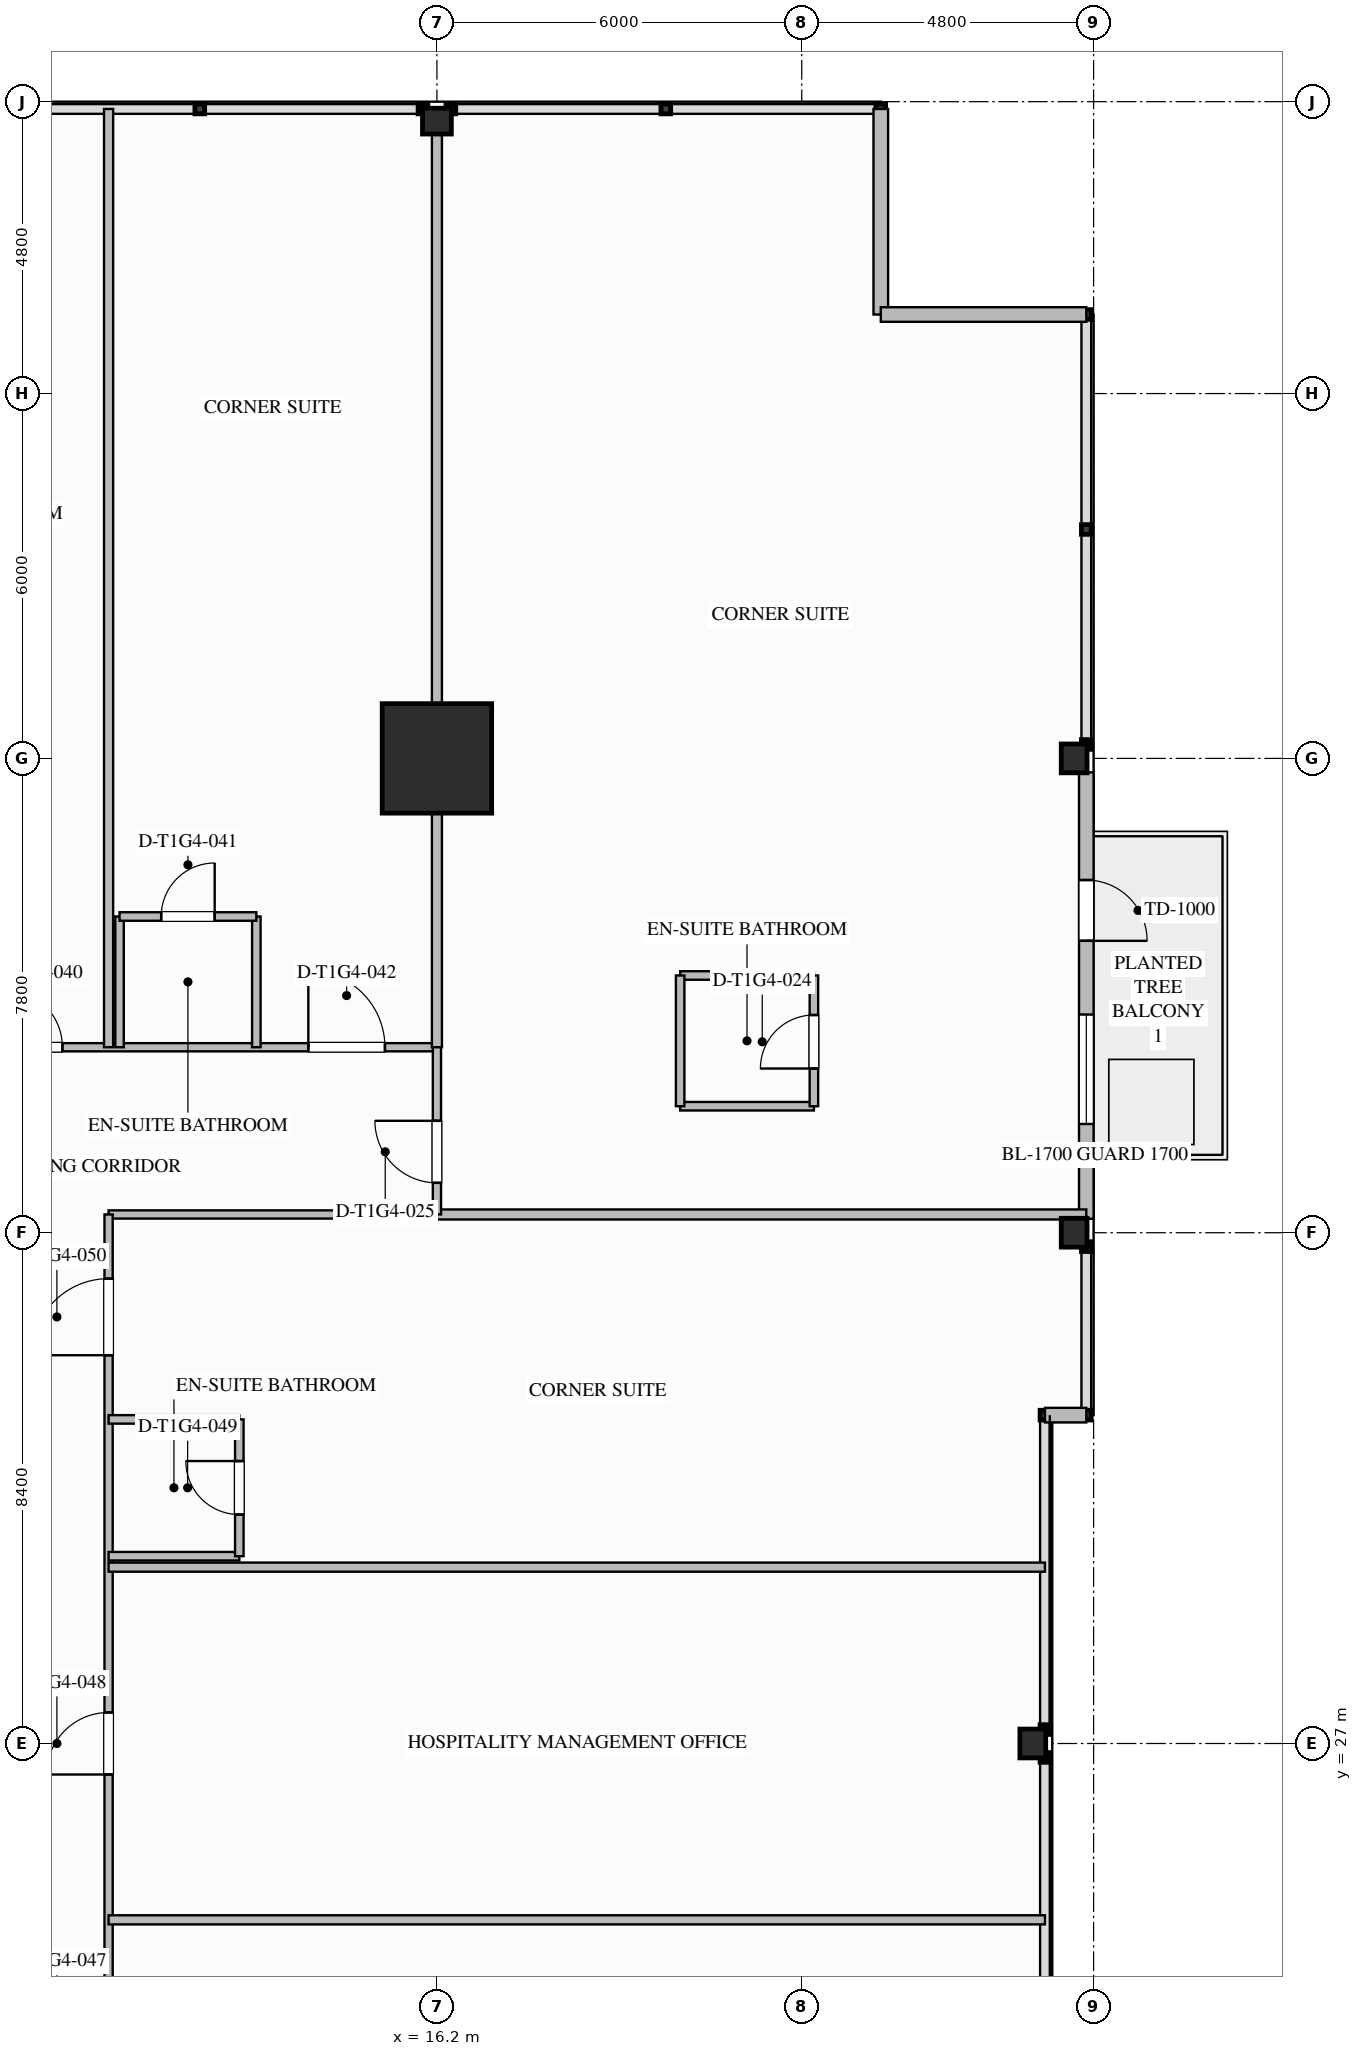
"""IFC4 building model, lengths in metres.
Left out: names, types, materials, properties, quantities, classifications, styles, units other than length and angle.
Written with IfcOpenShell. Run it as: python <this file> out.ifc"""

import sys

from ifc_helpers import new_model, si_unit, direction, frame, frame_2d, origin, origin_2d, place, context, subcontext, project, spatial, rectangle, i_section, extrude, element, fill, save


model = new_model("IFC4")
c1 = context("Model", 3, precision=1e-05, world=origin(), true_north=direction((0.0, 1.0)))
c2 = subcontext(c1, "Body", "Model", "MODEL_VIEW")
j1 = project(units=[si_unit("LENGTHUNIT", "METRE"), si_unit("PLANEANGLEUNIT", "RADIAN")], contexts=[c1])
p1 = place(None, origin())
s1 = spatial("IfcSite", under=j1, at=p1, CompositionType="ELEMENT")
p2 = place(p1, origin())
s2 = spatial("IfcBuilding", under=s1, at=p2, CompositionType="ELEMENT")
p3 = place(p2, frame((0.0, 0.0, 64.7)))
s3 = spatial("IfcBuildingStorey", under=s2, at=p3, CompositionType="ELEMENT", Elevation=64.7)
p4 = place(p3, frame((16.2, 43.2, 0.0), z_axis=(0.0, 0.0, 1.0), x_axis=(1.0, 0.0, 0.0)))
e1 = element("IfcColumn", 1, at=p4, inside=s3, PredefinedType="COLUMN", context=c2, shape_type="SweptSolid", body=[
    extrude(rectangle(XDim=1.8, YDim=1.8, at=origin_2d()), origin(), (0.0, 0.0, 1.0), 3.5),
])
for number, where, z_axis, x_axis in (
    (2, (26.0, 27.0, 0.0), (0.0, 0.0, 1.0), (1.0, 0.0, 0.0)),
    (3, (26.68, 35.4, 0.0), (0.0, 0.0, 1.0), (1.0, 0.0, 0.0)),
    (4, (26.68, 43.2, 0.0), (0.0, 0.0, 1.0), (1.0, 0.0, 0.0)),
    (5, (16.2, 53.68, 0.0), (0.0, 0.0, 1.0), (0.0, 1.0, 0.0)),
):
    element("IfcColumn", number, at=place(p3, frame(where, z_axis=z_axis, x_axis=x_axis)), inside=s3, PredefinedType="COLUMN", context=c2, shape_type="SweptSolid", body=[
        extrude(i_section(OverallWidth=0.424, OverallDepth=0.474, WebThickness=0.048, FlangeThickness=0.077, FilletRadius=0.03, at=origin_2d()), origin(), (0.0, 0.0, 1.0), 3.497),
    ])
p5 = place(p3, frame((26.88, 42.971, 0.0), z_axis=(0.0, 0.0, 1.0), x_axis=(0.0, -1.0, 0.0)))
e6 = element("IfcWall", 6, at=p5, inside=s3, PredefinedType="STANDARD", context=c2, shape_type="SweptSolid", body=[
    extrude(rectangle(XDim=7.342, YDim=0.24, at=frame_2d((3.671, 0.0))), origin(), (0.0, 0.0, 1.0), 2.629),
])
p6 = place(p5, frame((1.771, 0.0, 0.0)))
e7 = element("IfcOpeningElement", 7, at=p6, cuts=e6, PredefinedType="OPENING", context=c2, shape_type="SweptSolid", body=[
    extrude(rectangle(XDim=1.0, YDim=2.2, at=frame_2d((0.5, 1.1))), frame((0.0, 0.13, 0.0), z_axis=(0.0, -1.0, 0.0), x_axis=(1.0, 0.0, 0.0)), (0.0, 0.0, 1.0), 0.26),
])
p7 = place(p5, frame((3.983, 0.0, 0.75)))
e8 = element("IfcOpeningElement", 8, at=p7, cuts=e6, PredefinedType="OPENING", context=c2, shape_type="SweptSolid", body=[
    extrude(rectangle(XDim=1.8, YDim=1.779, at=frame_2d((0.9, 0.89))), frame((0.0, 0.13, 0.0), z_axis=(0.0, -1.0, 0.0), x_axis=(1.0, 0.0, 0.0)), (0.0, 0.0, 1.0), 0.26),
])
for number, where, z_axis, x_axis in (
    (9, (23.5, 53.88, 0.0), (0.0, 0.0, 1.0), (0.0, -1.0, 0.0)),
    (10, (23.5, 50.5, 0.0), (0.0, 0.0, 1.0), (1.0, 0.0, 0.0)),
):
    element("IfcWall", number, at=place(p3, frame(where, z_axis=z_axis, x_axis=x_axis)), inside=s3, PredefinedType="STANDARD", context=c2, shape_type="SweptSolid", body=[
        extrude(rectangle(XDim=3.38, YDim=0.24, at=frame_2d((1.69, 0.0))), origin(), (0.0, 0.0, 1.0), 3.24),
    ])
p8 = place(p3, frame((26.88, 32.4, 0.0), z_axis=(0.0, 0.0, 1.0), x_axis=(-1.0, 0.0, 0.0)))
e11 = element("IfcWall", 11, at=p8, inside=s3, PredefinedType="STANDARD", context=c2, shape_type="SweptSolid", body=[
    extrude(rectangle(XDim=0.68, YDim=0.24, at=frame_2d((0.34, 0.0))), origin(), (0.0, 0.0, 1.0), 3.24),
])
p9 = place(p3, frame((-16.2, 38.45, 0.0), z_axis=(0.0, 0.0, 1.0), x_axis=(1.0, 0.0, 0.0)))
e12 = element("IfcWall", 12, at=p9, inside=s3, PredefinedType="PARTITIONING", context=c2, shape_type="SweptSolid", body=[
    extrude(rectangle(XDim=32.4, YDim=0.135, at=frame_2d((16.2, 0.0))), origin(), (0.0, 0.0, 1.0), 3.24),
])
p10 = place(p9, frame((3.285, 0.0, 0.0)))
e13 = element("IfcOpeningElement", 13, at=p10, cuts=e12, PredefinedType="OPENING", context=c2, shape_type="SweptSolid", body=[
    extrude(rectangle(XDim=1.26, YDim=2.2, at=frame_2d((0.63, 1.1))), frame((0.0, 0.077, 0.0), z_axis=(0.0, -1.0, 0.0), x_axis=(1.0, 0.0, 0.0)), (0.0, 0.0, 1.0), 0.155),
])
p11 = place(p9, frame((8.59, 0.0, 0.0)))
e14 = element("IfcOpeningElement", 14, at=p11, cuts=e12, PredefinedType="OPENING", context=c2, shape_type="SweptSolid", body=[
    extrude(rectangle(XDim=0.96, YDim=2.15, at=frame_2d((0.48, 1.075))), frame((0.0, 0.077, 0.0), z_axis=(0.0, -1.0, 0.0), x_axis=(1.0, 0.0, 0.0)), (0.0, 0.0, 1.0), 0.155),
])
p12 = place(p9, frame((13.84, 0.0, 0.0)))
e15 = element("IfcOpeningElement", 15, at=p12, cuts=e12, PredefinedType="OPENING", context=c2, shape_type="SweptSolid", body=[
    extrude(rectangle(XDim=1.26, YDim=2.2, at=frame_2d((0.63, 1.1))), frame((0.0, 0.077, 0.0), z_axis=(0.0, -1.0, 0.0), x_axis=(1.0, 0.0, 0.0)), (0.0, 0.0, 1.0), 0.155),
])
p13 = place(p9, frame((18.635, 0.0, 0.0)))
e16 = element("IfcOpeningElement", 16, at=p13, cuts=e12, PredefinedType="OPENING", context=c2, shape_type="SweptSolid", body=[
    extrude(rectangle(XDim=1.02, YDim=2.15, at=frame_2d((0.51, 1.075))), frame((0.0, 0.077, 0.0), z_axis=(0.0, -1.0, 0.0), x_axis=(1.0, 0.0, 0.0)), (0.0, 0.0, 1.0), 0.155),
])
p14 = place(p9, frame((25.281, 0.0, 0.0)))
e17 = element("IfcOpeningElement", 17, at=p14, cuts=e12, PredefinedType="OPENING", context=c2, shape_type="SweptSolid", body=[
    extrude(rectangle(XDim=0.96, YDim=2.15, at=frame_2d((0.48, 1.075))), frame((0.0, 0.077, 0.0), z_axis=(0.0, -1.0, 0.0), x_axis=(1.0, 0.0, 0.0)), (0.0, 0.0, 1.0), 0.155),
])
p15 = place(p9, frame((30.285, 0.0, 0.0)))
e18 = element("IfcOpeningElement", 18, at=p15, cuts=e12, PredefinedType="OPENING", context=c2, shape_type="SweptSolid", body=[
    extrude(rectangle(XDim=1.26, YDim=2.2, at=frame_2d((0.63, 1.1))), frame((0.0, 0.077, 0.0), z_axis=(0.0, -1.0, 0.0), x_axis=(1.0, 0.0, 0.0)), (0.0, 0.0, 1.0), 0.155),
])
p16 = place(p3, frame((10.8, 35.7, 0.0), z_axis=(0.0, 0.0, 1.0), x_axis=(1.0, 0.0, 0.0)))
e19 = element("IfcWall", 19, at=p16, inside=s3, PredefinedType="PARTITIONING", context=c2, shape_type="SweptSolid", body=[
    extrude(rectangle(XDim=5.4, YDim=0.135, at=frame_2d((2.7, 0.0))), origin(), (0.0, 0.0, 1.0), 3.24),
])
p17 = place(p3, frame((10.8, 18.3, 0.0), z_axis=(0.0, 0.0, 1.0), x_axis=(0.0, 1.0, 0.0)))
e20 = element("IfcWall", 20, at=p17, inside=s3, PredefinedType="PARTITIONING", context=c2, shape_type="SweptSolid", body=[
    extrude(rectangle(XDim=17.4, YDim=0.135, at=frame_2d((8.7, 0.0))), origin(), (0.0, 0.0, 1.0), 3.24),
])
p18 = place(p17, frame((3.485, 0.0, 0.0)))
e21 = element("IfcOpeningElement", 21, at=p18, cuts=e20, PredefinedType="OPENING", context=c2, shape_type="SweptSolid", body=[
    extrude(rectangle(XDim=1.26, YDim=2.2, at=frame_2d((0.63, 1.1))), frame((0.0, 0.077, 0.0), z_axis=(0.0, -1.0, 0.0), x_axis=(1.0, 0.0, 0.0)), (0.0, 0.0, 1.0), 0.155),
])
p19 = place(p17, frame((8.19, 0.0, 0.0)))
e22 = element("IfcOpeningElement", 22, at=p19, cuts=e20, PredefinedType="OPENING", context=c2, shape_type="SweptSolid", body=[
    extrude(rectangle(XDim=1.02, YDim=2.15, at=frame_2d((0.51, 1.075))), frame((0.0, 0.077, 0.0), z_axis=(0.0, -1.0, 0.0), x_axis=(1.0, 0.0, 0.0)), (0.0, 0.0, 1.0), 0.155),
])
p20 = place(p17, frame((15.085, 0.0, 0.0)))
e23 = element("IfcOpeningElement", 23, at=p20, cuts=e20, PredefinedType="OPENING", context=c2, shape_type="SweptSolid", body=[
    extrude(rectangle(XDim=1.26, YDim=2.2, at=frame_2d((0.63, 1.1))), frame((0.0, 0.077, 0.0), z_axis=(0.0, -1.0, 0.0), x_axis=(1.0, 0.0, 0.0)), (0.0, 0.0, 1.0), 0.155),
])
p21 = place(p3, frame((16.2, 38.45, 0.0), z_axis=(0.0, 0.0, 1.0), x_axis=(0.0, 1.0, 0.0)))
e24 = element("IfcWall", 24, at=p21, inside=s3, PredefinedType="PARTITIONING", context=c2, shape_type="SweptSolid", body=[
    extrude(rectangle(XDim=15.43, YDim=0.165, at=frame_2d((7.715, 0.0))), origin(), (0.0, 0.0, 1.0), 2.452),
])
p22 = place(p3, frame((16.2, 35.7, 0.0), z_axis=(0.0, 0.0, 1.0), x_axis=(1.0, 0.0, 0.0)))
e25 = element("IfcWall", 25, at=p22, inside=s3, PredefinedType="PARTITIONING", context=c2, shape_type="SweptSolid", body=[
    extrude(rectangle(XDim=10.68, YDim=0.165, at=frame_2d((5.34, 0.0))), origin(), (0.0, 0.0, 1.0), 2.452),
])
p23 = place(p3, frame((16.2, 35.7, 0.0), z_axis=(0.0, 0.0, 1.0), x_axis=(0.0, 1.0, 0.0)))
e26 = element("IfcWall", 26, at=p23, inside=s3, PredefinedType="PARTITIONING", context=c2, shape_type="SweptSolid", body=[
    extrude(rectangle(XDim=2.75, YDim=0.135, at=frame_2d((1.375, 0.0))), origin(), (0.0, 0.0, 1.0), 2.452),
])
p24 = place(p23, frame((0.52, 0.0, 0.0)))
e27 = element("IfcOpeningElement", 27, at=p24, cuts=e26, PredefinedType="OPENING", context=c2, shape_type="SweptSolid", body=[
    extrude(rectangle(XDim=1.02, YDim=2.15, at=frame_2d((0.51, 1.075))), frame((0.0, 0.077, 0.0), z_axis=(0.0, -1.0, 0.0), x_axis=(1.0, 0.0, 0.0)), (0.0, 0.0, 1.0), 0.155),
])
for number, where, z_axis, x_axis in (
    (28, (20.2, 37.48, 0.0), (0.0, 0.0, 1.0), (1.0, 0.0, 0.0)),
    (29, (20.2, 39.63, 0.0), (0.0, 0.0, 1.0), (1.0, 0.0, 0.0)),
):
    element("IfcWall", number, at=place(p3, frame(where, z_axis=z_axis, x_axis=x_axis)), inside=s3, PredefinedType="PLUMBINGWALL", context=c2, shape_type="SweptSolid", body=[
        extrude(rectangle(XDim=2.2, YDim=0.14, at=frame_2d((1.1, 0.0))), origin(), (0.0, 0.0, 1.0), 3.24),
    ])
p25 = place(p3, frame((20.2, 37.48, 0.0), z_axis=(0.0, 0.0, 1.0), x_axis=(0.0, 1.0, 0.0)))
e30 = element("IfcWall", 30, at=p25, inside=s3, PredefinedType="PLUMBINGWALL", context=c2, shape_type="SweptSolid", body=[
    extrude(rectangle(XDim=2.15, YDim=0.14, at=frame_2d((1.075, 0.0))), origin(), (0.0, 0.0, 1.0), 3.24),
])
p26 = place(p3, frame((22.4, 37.48, 0.0), z_axis=(0.0, 0.0, 1.0), x_axis=(0.0, 1.0, 0.0)))
e31 = element("IfcWall", 31, at=p26, inside=s3, PredefinedType="PLUMBINGWALL", context=c2, shape_type="SweptSolid", body=[
    extrude(rectangle(XDim=2.15, YDim=0.14, at=frame_2d((1.075, 0.0))), origin(), (0.0, 0.0, 1.0), 3.24),
])
p27 = place(p26, frame((0.62, 0.0, 0.0)))
e32 = element("IfcOpeningElement", 32, at=p27, cuts=e31, PredefinedType="OPENING", context=c2, shape_type="SweptSolid", body=[
    extrude(rectangle(XDim=0.88, YDim=2.1, at=frame_2d((0.44, 1.05))), frame((0.0, 0.08, 0.0), z_axis=(0.0, -1.0, 0.0), x_axis=(1.0, 0.0, 0.0)), (0.0, 0.0, 1.0), 0.16),
])
p28 = place(p3, frame((10.8, 38.45, 0.0), z_axis=(0.0, 0.0, 1.0), x_axis=(0.0, 1.0, 0.0)))
e33 = element("IfcWall", 33, at=p28, inside=s3, PredefinedType="PARTITIONING", context=c2, shape_type="SweptSolid", body=[
    extrude(rectangle(XDim=15.43, YDim=0.15, at=frame_2d((7.715, 0.0))), origin(), (0.0, 0.0, 1.0), 3.24),
])
for number, where, z_axis, x_axis in (
    (34, (10.98, 38.45, 0.0), (0.0, 0.0, 1.0), (0.0, 1.0, 0.0)),
    (35, (13.23, 38.45, 0.0), (0.0, 0.0, 1.0), (0.0, 1.0, 0.0)),
):
    element("IfcWall", number, at=place(p3, frame(where, z_axis=z_axis, x_axis=x_axis)), inside=s3, PredefinedType="PLUMBINGWALL", context=c2, shape_type="SweptSolid", body=[
        extrude(rectangle(XDim=2.15, YDim=0.14, at=frame_2d((1.075, 0.0))), origin(), (0.0, 0.0, 1.0), 3.24),
    ])
p29 = place(p3, frame((10.98, 40.6, 0.0), z_axis=(0.0, 0.0, 1.0), x_axis=(1.0, 0.0, 0.0)))
e36 = element("IfcWall", 36, at=p29, inside=s3, PredefinedType="PLUMBINGWALL", context=c2, shape_type="SweptSolid", body=[
    extrude(rectangle(XDim=2.25, YDim=0.14, at=frame_2d((1.125, 0.0))), origin(), (0.0, 0.0, 1.0), 3.24),
])
p30 = place(p29, frame((0.685, 0.0, 0.0)))
e37 = element("IfcOpeningElement", 37, at=p30, cuts=e36, PredefinedType="OPENING", context=c2, shape_type="SweptSolid", body=[
    extrude(rectangle(XDim=0.88, YDim=2.1, at=frame_2d((0.44, 1.05))), frame((0.0, 0.08, 0.0), z_axis=(0.0, -1.0, 0.0), x_axis=(1.0, 0.0, 0.0)), (0.0, 0.0, 1.0), 0.16),
])
for number, where, z_axis, x_axis in (
    (38, (10.8, 24.1, 0.0), (0.0, 0.0, 1.0), (1.0, 0.0, 0.0)),
    (39, (10.8, 29.9, 0.0), (0.0, 0.0, 1.0), (1.0, 0.0, 0.0)),
):
    element("IfcWall", number, at=place(p3, frame(where, z_axis=z_axis, x_axis=x_axis)), inside=s3, PredefinedType="PARTITIONING", context=c2, shape_type="SweptSolid", body=[
        extrude(rectangle(XDim=15.4, YDim=0.15, at=frame_2d((7.7, 0.0))), origin(), (0.0, 0.0, 1.0), 3.24),
    ])
for number, where, z_axis, x_axis in (
    (40, (10.8, 30.08, 0.0), (0.0, 0.0, 1.0), (1.0, 0.0, 0.0)),
    (41, (10.8, 32.33, 0.0), (0.0, 0.0, 1.0), (1.0, 0.0, 0.0)),
):
    element("IfcWall", number, at=place(p3, frame(where, z_axis=z_axis, x_axis=x_axis)), inside=s3, PredefinedType="PLUMBINGWALL", context=c2, shape_type="SweptSolid", body=[
        extrude(rectangle(XDim=2.15, YDim=0.14, at=frame_2d((1.075, 0.0))), origin(), (0.0, 0.0, 1.0), 3.24),
    ])
p31 = place(p3, frame((12.95, 30.08, 0.0), z_axis=(0.0, 0.0, 1.0), x_axis=(0.0, 1.0, 0.0)))
e42 = element("IfcWall", 42, at=p31, inside=s3, PredefinedType="PLUMBINGWALL", context=c2, shape_type="SweptSolid", body=[
    extrude(rectangle(XDim=2.25, YDim=0.14, at=frame_2d((1.125, 0.0))), origin(), (0.0, 0.0, 1.0), 3.24),
])
p32 = place(p31, frame((0.685, 0.0, 0.0)))
e43 = element("IfcOpeningElement", 43, at=p32, cuts=e42, PredefinedType="OPENING", context=c2, shape_type="SweptSolid", body=[
    extrude(rectangle(XDim=0.88, YDim=2.1, at=frame_2d((0.44, 1.05))), frame((0.0, 0.08, 0.0), z_axis=(0.0, -1.0, 0.0), x_axis=(1.0, 0.0, 0.0)), (0.0, 0.0, 1.0), 0.16),
])
p33 = place(p6, origin())
e44 = element("IfcDoor", 44, at=p33, inside=s3, OperationType="SINGLE_SWING_RIGHT", PredefinedType="DOOR", context=c2, shape_type="SweptSolid", body=[
    extrude(rectangle(XDim=1.0, YDim=2.2, at=frame_2d((0.5, 1.1))), frame((0.0, 0.025, 0.0), z_axis=(0.0, -1.0, 0.0), x_axis=(1.0, 0.0, 0.0)), (0.0, 0.0, 1.0), 0.05),
])
fill(e7, e44)
p34 = place(p7, origin())
e45 = element("IfcWindow", 45, at=p34, inside=s3, PartitioningType="SINGLE_PANEL", PredefinedType="WINDOW", context=c2, shape_type="SweptSolid", body=[
    extrude(rectangle(XDim=1.8, YDim=1.779, at=frame_2d((0.9, 0.89))), frame((0.0, 0.03, 0.0), z_axis=(0.0, -1.0, 0.0), x_axis=(1.0, 0.0, 0.0)), (0.0, 0.0, 1.0), 0.06),
])
fill(e8, e45)
p35 = place(p27, origin())
e46 = element("IfcDoor", 46, at=p35, inside=s3, OperationType="SINGLE_SWING_LEFT", PredefinedType="DOOR", context=c2, shape_type="SweptSolid", body=[
    extrude(rectangle(XDim=0.88, YDim=2.1, at=frame_2d((0.44, 1.05))), frame((0.0, 0.025, 0.0), z_axis=(0.0, -1.0, 0.0), x_axis=(1.0, 0.0, 0.0)), (0.0, 0.0, 1.0), 0.05),
])
fill(e32, e46)
p36 = place(p24, origin())
e47 = element("IfcDoor", 47, at=p36, inside=s3, OperationType="SINGLE_SWING_RIGHT", PredefinedType="DOOR", context=c2, shape_type="SweptSolid", body=[
    extrude(rectangle(XDim=1.02, YDim=2.15, at=frame_2d((0.51, 1.075))), frame((0.0, 0.025, 0.0), z_axis=(0.0, -1.0, 0.0), x_axis=(1.0, 0.0, 0.0)), (0.0, 0.0, 1.0), 0.05),
])
fill(e27, e47)
p37 = place(p14, origin())
e48 = element("IfcDoor", 48, at=p37, inside=s3, OperationType="SINGLE_SWING_LEFT", PredefinedType="DOOR", context=c2, shape_type="SweptSolid", body=[
    extrude(rectangle(XDim=0.96, YDim=2.15, at=frame_2d((0.48, 1.075))), frame((0.0, 0.025, 0.0), z_axis=(0.0, -1.0, 0.0), x_axis=(1.0, 0.0, 0.0)), (0.0, 0.0, 1.0), 0.05),
])
fill(e17, e48)
p38 = place(p30, origin())
e49 = element("IfcDoor", 49, at=p38, inside=s3, OperationType="SINGLE_SWING_RIGHT", PredefinedType="DOOR", context=c2, shape_type="SweptSolid", body=[
    extrude(rectangle(XDim=0.88, YDim=2.1, at=frame_2d((0.44, 1.05))), frame((0.0, 0.025, 0.0), z_axis=(0.0, -1.0, 0.0), x_axis=(1.0, 0.0, 0.0)), (0.0, 0.0, 1.0), 0.05),
])
fill(e37, e49)
p39 = place(p15, origin())
e50 = element("IfcDoor", 50, at=p39, inside=s3, OperationType="SINGLE_SWING_LEFT", PredefinedType="DOOR", context=c2, shape_type="SweptSolid", body=[
    extrude(rectangle(XDim=1.26, YDim=2.2, at=frame_2d((0.63, 1.1))), frame((0.0, 0.025, 0.0), z_axis=(0.0, -1.0, 0.0), x_axis=(1.0, 0.0, 0.0)), (0.0, 0.0, 1.0), 0.05),
])
fill(e18, e50)
p40 = place(p19, origin())
e51 = element("IfcDoor", 51, at=p40, inside=s3, OperationType="SINGLE_SWING_LEFT", PredefinedType="DOOR", context=c2, shape_type="SweptSolid", body=[
    extrude(rectangle(XDim=1.02, YDim=2.15, at=frame_2d((0.51, 1.075))), frame((0.0, 0.025, 0.0), z_axis=(0.0, -1.0, 0.0), x_axis=(1.0, 0.0, 0.0)), (0.0, 0.0, 1.0), 0.05),
])
fill(e22, e51)
p41 = place(p32, origin())
e52 = element("IfcDoor", 52, at=p41, inside=s3, OperationType="SINGLE_SWING_RIGHT", PredefinedType="DOOR", context=c2, shape_type="SweptSolid", body=[
    extrude(rectangle(XDim=0.88, YDim=2.1, at=frame_2d((0.44, 1.05))), frame((0.0, 0.025, 0.0), z_axis=(0.0, -1.0, 0.0), x_axis=(1.0, 0.0, 0.0)), (0.0, 0.0, 1.0), 0.05),
])
fill(e43, e52)
p42 = place(p20, origin())
e53 = element("IfcDoor", 53, at=p42, inside=s3, OperationType="SINGLE_SWING_LEFT", PredefinedType="DOOR", context=c2, shape_type="SweptSolid", body=[
    extrude(rectangle(XDim=1.26, YDim=2.2, at=frame_2d((0.63, 1.1))), frame((0.0, 0.025, 0.0), z_axis=(0.0, -1.0, 0.0), x_axis=(1.0, 0.0, 0.0)), (0.0, 0.0, 1.0), 0.05),
])
fill(e23, e53)
save(model, sys.argv[1])
